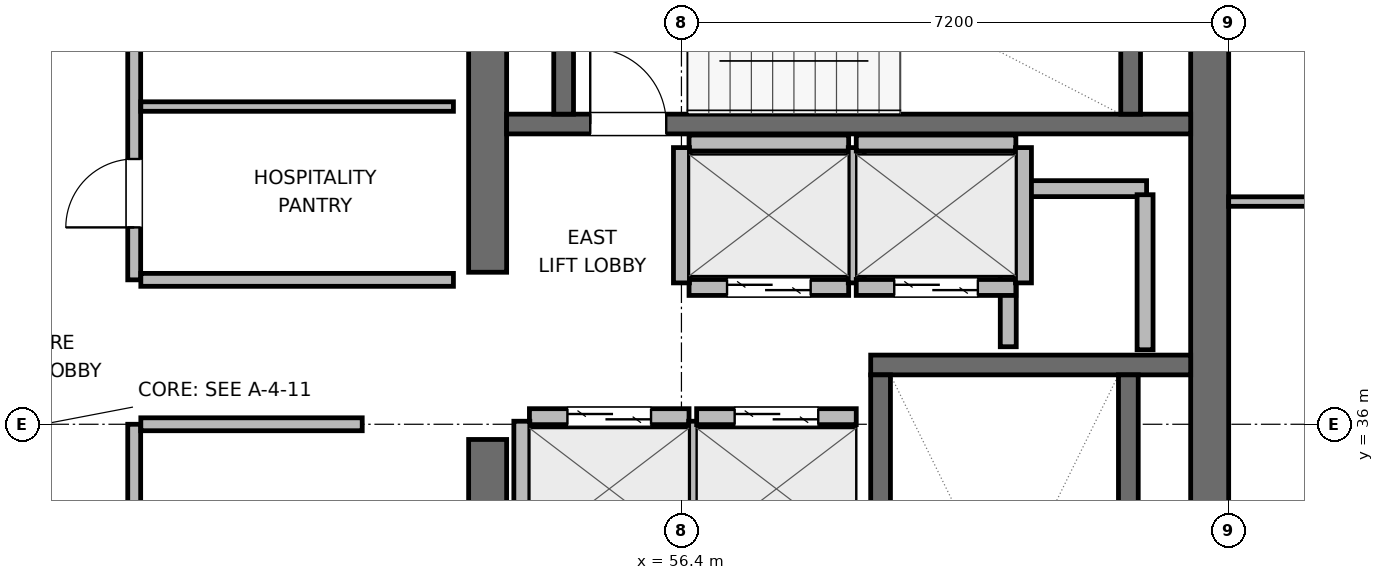
"""IFC4 building model, lengths in metres.
Left out: names, types, materials, properties, quantities, classifications, styles, units other than length and angle.
Written with IfcOpenShell. Run it as: python <this file> out.ifc"""

import sys

from ifc_helpers import new_model, si_unit, direction, frame, frame_2d, origin, place, context, subcontext, project, spatial, rectangle, extrude, element, fill, save


model = new_model("IFC4")
c1 = context("Model", 3, precision=1e-05, world=origin(), true_north=direction((0.0, 1.0)))
c2 = subcontext(c1, "Body", "Model", "MODEL_VIEW")
j1 = project(units=[si_unit("LENGTHUNIT", "METRE"), si_unit("PLANEANGLEUNIT", "RADIAN")], contexts=[c1])
p1 = place(None, origin())
s1 = spatial("IfcSite", under=j1, at=p1, CompositionType="ELEMENT")
p2 = place(p1, origin())
s2 = spatial("IfcBuilding", under=s1, at=p2, CompositionType="ELEMENT")
p3 = place(p2, frame((0.0, 0.0, 270.6)))
s3 = spatial("IfcBuildingStorey", under=s2, at=p3, CompositionType="ELEMENT", Elevation=270.6)
p4 = place(p3, frame((53.85, 27.85, 0.0), z_axis=(0.0, 0.0, 1.0), x_axis=(0.0, 1.0, 0.0)))
e1 = element("IfcWall", 1, at=p4, inside=s3, PredefinedType="SHEAR", context=c2, shape_type="SweptSolid", body=[
    extrude(rectangle(XDim=7.95, YDim=0.5, at=frame_2d((3.975, 0.0))), origin(), (0.0, 0.0, 1.0), 3.9),
])
p5 = place(p3, frame((53.85, 38.0, 0.0), z_axis=(0.0, 0.0, 1.0), x_axis=(0.0, 1.0, 0.0)))
e2 = element("IfcWall", 2, at=p5, inside=s3, PredefinedType="SHEAR", context=c2, shape_type="SweptSolid", body=[
    extrude(rectangle(XDim=6.15, YDim=0.5, at=frame_2d((3.075, 0.0))), origin(), (0.0, 0.0, 1.0), 3.9),
])
p6 = place(p3, frame((63.35, 27.6, 0.0), z_axis=(0.0, 0.0, 1.0), x_axis=(0.0, 1.0, 0.0)))
e3 = element("IfcWall", 3, at=p6, inside=s3, PredefinedType="SHEAR", context=c2, shape_type="SweptSolid", body=[
    extrude(rectangle(XDim=16.8, YDim=0.5, at=frame_2d((8.4, 0.0))), origin(), (0.0, 0.0, 1.0), 3.9),
])
p7 = place(p3, frame((58.89, 36.78, 0.0), z_axis=(0.0, 0.0, 1.0), x_axis=(1.0, 0.0, 0.0)))
e4 = element("IfcWall", 4, at=p7, inside=s3, PredefinedType="SHEAR", context=c2, shape_type="SweptSolid", body=[
    extrude(rectangle(XDim=4.21, YDim=0.26, at=frame_2d((2.105, 0.0))), origin(), (0.0, 0.0, 1.0), 3.9),
])
p8 = place(p3, frame((59.02, 29.05, 0.0), z_axis=(0.0, 0.0, 1.0), x_axis=(0.0, 1.0, 0.0)))
e5 = element("IfcWall", 5, at=p8, inside=s3, PredefinedType="SHEAR", context=c2, shape_type="SweptSolid", body=[
    extrude(rectangle(XDim=7.6, YDim=0.26, at=frame_2d((3.8, 0.0))), origin(), (0.0, 0.0, 1.0), 3.9),
])
p9 = place(p8, frame((0.3, 0.0, 0.0)))
e6 = element("IfcOpeningElement", 6, at=p9, cuts=e5, PredefinedType="OPENING", context=c2, shape_type="SweptSolid", body=[
    extrude(rectangle(XDim=1.0, YDim=2.04, at=frame_2d((0.5, 1.02))), frame((0.0, 0.14, 0.0), z_axis=(0.0, -1.0, 0.0), x_axis=(1.0, 0.0, 0.0)), (0.0, 0.0, 1.0), 0.28),
])
p10 = place(p3, frame((62.28, 29.05, 0.0), z_axis=(0.0, 0.0, 1.0), x_axis=(0.0, 1.0, 0.0)))
e7 = element("IfcWall", 7, at=p10, inside=s3, PredefinedType="SHEAR", context=c2, shape_type="SweptSolid", body=[
    extrude(rectangle(XDim=7.6, YDim=0.26, at=frame_2d((3.8, 0.0))), origin(), (0.0, 0.0, 1.0), 3.9),
])
p11 = place(p3, frame((54.1, 39.95, 0.0), z_axis=(0.0, 0.0, 1.0), x_axis=(1.0, 0.0, 0.0)))
e8 = element("IfcWall", 8, at=p11, inside=s3, PredefinedType="SHEAR", context=c2, shape_type="SweptSolid", body=[
    extrude(rectangle(XDim=9.0, YDim=0.26, at=frame_2d((4.5, 0.0))), origin(), (0.0, 0.0, 1.0), 3.9),
])
p12 = place(p11, frame((1.1, 0.0, 0.0)))
e9 = element("IfcOpeningElement", 9, at=p12, cuts=e8, PredefinedType="OPENING", context=c2, shape_type="SweptSolid", body=[
    extrude(rectangle(XDim=1.0, YDim=2.04, at=frame_2d((0.5, 1.02))), frame((0.0, 0.14, 0.0), z_axis=(0.0, -1.0, 0.0), x_axis=(1.0, 0.0, 0.0)), (0.0, 0.0, 1.0), 0.28),
])
for number, where, z_axis, x_axis in (
    (10, (54.85, 40.08, 0.0), (0.0, 0.0, 1.0), (0.0, 1.0, 0.0)),
    (11, (62.31, 40.08, 0.0), (0.0, 0.0, 1.0), (0.0, 1.0, 0.0)),
):
    element("IfcWall", number, at=place(p3, frame(where, z_axis=z_axis, x_axis=x_axis)), inside=s3, PredefinedType="SHEAR", context=c2, shape_type="SweptSolid", body=[
        extrude(rectangle(XDim=2.94, YDim=0.26, at=frame_2d((1.47, 0.0))), origin(), (0.0, 0.0, 1.0), 3.9),
    ])
p13 = place(p3, frame((60.72, 39.1, 0.0), z_axis=(0.0, 0.0, 1.0), x_axis=(1.0, 0.0, 0.0)))
e12 = element("IfcWall", 12, at=p13, inside=s3, PredefinedType="PARTITIONING", context=c2, shape_type="SweptSolid", body=[
    extrude(rectangle(XDim=1.8, YDim=0.21, at=frame_2d((0.9, 0.0))), origin(), (0.0, 0.0, 1.0), 3.68),
])
p14 = place(p3, frame((60.7, 37.02, 0.0), z_axis=(0.0, 0.0, 1.0), x_axis=(0.0, 1.0, 0.0)))
e13 = element("IfcWall", 13, at=p14, inside=s3, PredefinedType="PARTITIONING", context=c2, shape_type="SweptSolid", body=[
    extrude(rectangle(XDim=1.96, YDim=0.21, at=frame_2d((0.98, 0.0))), origin(), (0.0, 0.0, 1.0), 3.68),
])
p15 = place(p3, frame((62.5, 36.98, 0.0), z_axis=(0.0, 0.0, 1.0), x_axis=(0.0, 1.0, 0.0)))
e14 = element("IfcWall", 14, at=p15, inside=s3, PredefinedType="PARTITIONING", context=c2, shape_type="SweptSolid", body=[
    extrude(rectangle(XDim=2.04, YDim=0.21, at=frame_2d((1.02, 0.0))), origin(), (0.0, 0.0, 1.0), 3.68),
])
p16 = place(p3, frame((54.4, 36.1, 0.0), z_axis=(0.0, 0.0, 1.0), x_axis=(1.0, 0.0, 0.0)))
e15 = element("IfcWall", 15, at=p16, inside=s3, PredefinedType="PARTITIONING", context=c2, shape_type="SweptSolid", body=[
    extrude(rectangle(XDim=2.1, YDim=0.21, at=frame_2d((1.05, 0.0))), origin(), (0.0, 0.0, 1.0), 3.68),
])
p17 = place(p16, frame((0.5, 0.0, 0.0)))
e16 = element("IfcOpeningElement", 16, at=p17, cuts=e15, PredefinedType="OPENING", context=c2, shape_type="SweptSolid", body=[
    extrude(rectangle(XDim=1.1, YDim=2.04, at=frame_2d((0.55, 1.02))), frame((0.0, 0.115, 0.0), z_axis=(0.0, -1.0, 0.0), x_axis=(1.0, 0.0, 0.0)), (0.0, 0.0, 1.0), 0.23),
])
for number, where, z_axis, x_axis in (
    (17, (54.3, 34.26, 0.0), (0.0, 0.0, 1.0), (0.0, 1.0, 0.0)),
    (18, (56.6, 34.26, 0.0), (0.0, 0.0, 1.0), (0.0, 1.0, 0.0)),
):
    element("IfcWall", number, at=place(p3, frame(where, z_axis=z_axis, x_axis=x_axis)), inside=s3, PredefinedType="PARTITIONING", context=c2, shape_type="SweptSolid", body=[
        extrude(rectangle(XDim=1.78, YDim=0.21, at=frame_2d((0.89, 0.0))), origin(), (0.0, 0.0, 1.0), 3.68),
    ])
p18 = place(p3, frame((56.6, 36.1, 0.0), z_axis=(0.0, 0.0, 1.0), x_axis=(1.0, 0.0, 0.0)))
e19 = element("IfcWall", 19, at=p18, inside=s3, PredefinedType="PARTITIONING", context=c2, shape_type="SweptSolid", body=[
    extrude(rectangle(XDim=2.1, YDim=0.21, at=frame_2d((1.05, 0.0))), origin(), (0.0, 0.0, 1.0), 3.68),
])
p19 = place(p18, frame((0.5, 0.0, 0.0)))
e20 = element("IfcOpeningElement", 20, at=p19, cuts=e19, PredefinedType="OPENING", context=c2, shape_type="SweptSolid", body=[
    extrude(rectangle(XDim=1.1, YDim=2.04, at=frame_2d((0.55, 1.02))), frame((0.0, 0.115, 0.0), z_axis=(0.0, -1.0, 0.0), x_axis=(1.0, 0.0, 0.0)), (0.0, 0.0, 1.0), 0.23),
])
p20 = place(p3, frame((56.5, 37.8, 0.0), z_axis=(0.0, 0.0, 1.0), x_axis=(1.0, 0.0, 0.0)))
e21 = element("IfcWall", 21, at=p20, inside=s3, PredefinedType="PARTITIONING", context=c2, shape_type="SweptSolid", body=[
    extrude(rectangle(XDim=2.1, YDim=0.21, at=frame_2d((1.05, 0.0))), origin(), (0.0, 0.0, 1.0), 3.68),
])
p21 = place(p20, frame((0.5, 0.0, 0.0)))
e22 = element("IfcOpeningElement", 22, at=p21, cuts=e21, PredefinedType="OPENING", context=c2, shape_type="SweptSolid", body=[
    extrude(rectangle(XDim=1.1, YDim=2.04, at=frame_2d((0.55, 1.02))), frame((0.0, 0.115, 0.0), z_axis=(0.0, -1.0, 0.0), x_axis=(1.0, 0.0, 0.0)), (0.0, 0.0, 1.0), 0.23),
])
p22 = place(p3, frame((56.5, 39.7, 0.0), z_axis=(0.0, 0.0, 1.0), x_axis=(1.0, 0.0, 0.0)))
e23 = element("IfcWall", 23, at=p22, inside=s3, PredefinedType="PARTITIONING", context=c2, shape_type="SweptSolid", body=[
    extrude(rectangle(XDim=2.1, YDim=0.21, at=frame_2d((1.05, 0.0))), origin(), (0.0, 0.0, 1.0), 3.68),
])
for number, where, z_axis, x_axis in (
    (24, (56.4, 37.86, 0.0), (0.0, 0.0, 1.0), (0.0, 1.0, 0.0)),
    (25, (58.7, 37.86, 0.0), (0.0, 0.0, 1.0), (0.0, 1.0, 0.0)),
):
    element("IfcWall", number, at=place(p3, frame(where, z_axis=z_axis, x_axis=x_axis)), inside=s3, PredefinedType="PARTITIONING", context=c2, shape_type="SweptSolid", body=[
        extrude(rectangle(XDim=1.78, YDim=0.21, at=frame_2d((0.89, 0.0))), origin(), (0.0, 0.0, 1.0), 3.68),
    ])
p23 = place(p3, frame((58.7, 37.8, 0.0), z_axis=(0.0, 0.0, 1.0), x_axis=(1.0, 0.0, 0.0)))
e26 = element("IfcWall", 26, at=p23, inside=s3, PredefinedType="PARTITIONING", context=c2, shape_type="SweptSolid", body=[
    extrude(rectangle(XDim=2.1, YDim=0.21, at=frame_2d((1.05, 0.0))), origin(), (0.0, 0.0, 1.0), 3.68),
])
p24 = place(p23, frame((0.5, 0.0, 0.0)))
e27 = element("IfcOpeningElement", 27, at=p24, cuts=e26, PredefinedType="OPENING", context=c2, shape_type="SweptSolid", body=[
    extrude(rectangle(XDim=1.1, YDim=2.04, at=frame_2d((0.55, 1.02))), frame((0.0, 0.115, 0.0), z_axis=(0.0, -1.0, 0.0), x_axis=(1.0, 0.0, 0.0)), (0.0, 0.0, 1.0), 0.23),
])
p25 = place(p3, frame((58.7, 39.7, 0.0), z_axis=(0.0, 0.0, 1.0), x_axis=(1.0, 0.0, 0.0)))
e28 = element("IfcWall", 28, at=p25, inside=s3, PredefinedType="PARTITIONING", context=c2, shape_type="SweptSolid", body=[
    extrude(rectangle(XDim=2.1, YDim=0.21, at=frame_2d((1.05, 0.0))), origin(), (0.0, 0.0, 1.0), 3.68),
])
p26 = place(p3, frame((60.9, 37.86, 0.0), z_axis=(0.0, 0.0, 1.0), x_axis=(0.0, 1.0, 0.0)))
e29 = element("IfcWall", 29, at=p26, inside=s3, PredefinedType="PARTITIONING", context=c2, shape_type="SweptSolid", body=[
    extrude(rectangle(XDim=1.78, YDim=0.21, at=frame_2d((0.89, 0.0))), origin(), (0.0, 0.0, 1.0), 3.68),
])
p27 = place(p3, frame((49.2, 32.6, 0.0), z_axis=(0.0, 0.0, 1.0), x_axis=(0.0, 1.0, 0.0)))
e30 = element("IfcWall", 30, at=p27, inside=s3, PredefinedType="PARTITIONING", context=c2, shape_type="SweptSolid", body=[
    extrude(rectangle(XDim=3.4, YDim=0.17, at=frame_2d((1.7, 0.0))), origin(), (0.0, 0.0, 1.0), 3.68),
])
p28 = place(p27, frame((0.638, 0.0, 0.0)))
e31 = element("IfcOpeningElement", 31, at=p28, cuts=e30, PredefinedType="OPENING", context=c2, shape_type="SweptSolid", body=[
    extrude(rectangle(XDim=0.9, YDim=2.02, at=frame_2d((0.45, 1.01))), frame((0.0, 0.095, 0.0), z_axis=(0.0, -1.0, 0.0), x_axis=(1.0, 0.0, 0.0)), (0.0, 0.0, 1.0), 0.19),
])
p29 = place(p3, frame((49.287, 36.0, 0.0), z_axis=(0.0, 0.0, 1.0), x_axis=(1.0, 0.0, 0.0)))
e32 = element("IfcWall", 32, at=p29, inside=s3, PredefinedType="PARTITIONING", context=c2, shape_type="SweptSolid", body=[
    extrude(rectangle(XDim=2.913, YDim=0.17, at=frame_2d((1.457, 0.0))), origin(), (0.0, 0.0, 1.0), 3.68),
])
p30 = place(p3, frame((49.2, 37.9, 0.0), z_axis=(0.0, 0.0, 1.0), x_axis=(0.0, 1.0, 0.0)))
e33 = element("IfcWall", 33, at=p30, inside=s3, PredefinedType="PARTITIONING", context=c2, shape_type="SweptSolid", body=[
    extrude(rectangle(XDim=6.0, YDim=0.17, at=frame_2d((3.0, 0.0))), origin(), (0.0, 0.0, 1.0), 3.68),
])
p31 = place(p30, frame((0.69, 0.0, 0.0)))
e34 = element("IfcOpeningElement", 34, at=p31, cuts=e33, PredefinedType="OPENING", context=c2, shape_type="SweptSolid", body=[
    extrude(rectangle(XDim=0.9, YDim=2.02, at=frame_2d((0.45, 1.01))), frame((0.0, 0.095, 0.0), z_axis=(0.0, -1.0, 0.0), x_axis=(1.0, 0.0, 0.0)), (0.0, 0.0, 1.0), 0.19),
])
p32 = place(p30, frame((3.69, 0.0, 0.0)))
e35 = element("IfcOpeningElement", 35, at=p32, cuts=e33, PredefinedType="OPENING", context=c2, shape_type="SweptSolid", body=[
    extrude(rectangle(XDim=0.9, YDim=2.02, at=frame_2d((0.45, 1.01))), frame((0.0, 0.095, 0.0), z_axis=(0.0, -1.0, 0.0), x_axis=(1.0, 0.0, 0.0)), (0.0, 0.0, 1.0), 0.19),
])
p33 = place(p3, frame((49.287, 37.9, 0.0), z_axis=(0.0, 0.0, 1.0), x_axis=(1.0, 0.0, 0.0)))
e36 = element("IfcWall", 36, at=p33, inside=s3, PredefinedType="PARTITIONING", context=c2, shape_type="SweptSolid", body=[
    extrude(rectangle(XDim=4.113, YDim=0.17, at=frame_2d((2.056, 0.0))), origin(), (0.0, 0.0, 1.0), 3.68),
])
p34 = place(p3, frame((49.287, 40.18, 0.0), z_axis=(0.0, 0.0, 1.0), x_axis=(1.0, 0.0, 0.0)))
e37 = element("IfcWall", 37, at=p34, inside=s3, PredefinedType="PARTITIONING", context=c2, shape_type="SweptSolid", body=[
    extrude(rectangle(XDim=4.113, YDim=0.125, at=frame_2d((2.056, 0.0))), origin(), (0.0, 0.0, 1.0), 3.68),
])
p35 = place(p3, frame((63.6, 38.93, 0.0), z_axis=(0.0, 0.0, 1.0), x_axis=(1.0, 0.0, 0.0)))
e38 = element("IfcWall", 38, at=p35, inside=s3, PredefinedType="PARTITIONING", context=c2, shape_type="SweptSolid", body=[
    extrude(rectangle(XDim=4.845, YDim=0.125, at=frame_2d((2.422, 0.0))), origin(), (0.0, 0.0, 1.0), 3.68),
])
p36 = place(p35, frame((2.1, 0.0, 0.0)))
e39 = element("IfcOpeningElement", 39, at=p36, cuts=e38, PredefinedType="OPENING", context=c2, shape_type="SweptSolid", body=[
    extrude(rectangle(XDim=0.9, YDim=2.02, at=frame_2d((0.45, 1.01))), frame((0.0, 0.073, 0.0), z_axis=(0.0, -1.0, 0.0), x_axis=(1.0, 0.0, 0.0)), (0.0, 0.0, 1.0), 0.145),
])
p37 = place(p12, origin())
e40 = element("IfcDoor", 40, at=p37, inside=s3, OperationType="SINGLE_SWING_LEFT", PredefinedType="DOOR", context=c2, shape_type="SweptSolid", body=[
    extrude(rectangle(XDim=1.0, YDim=2.04, at=frame_2d((0.5, 1.02))), frame((0.0, 0.025, 0.0), z_axis=(0.0, -1.0, 0.0), x_axis=(1.0, 0.0, 0.0)), (0.0, 0.0, 1.0), 0.05),
])
fill(e9, e40)
p38 = place(p17, origin())
e41 = element("IfcDoor", 41, at=p38, inside=s3, OperationType="DOUBLE_DOOR_SLIDING", PredefinedType="DOOR", context=c2, shape_type="SweptSolid", body=[
    extrude(rectangle(XDim=1.1, YDim=2.04, at=frame_2d((0.55, 1.02))), frame((0.0, 0.025, 0.0), z_axis=(0.0, -1.0, 0.0), x_axis=(1.0, 0.0, 0.0)), (0.0, 0.0, 1.0), 0.05),
])
fill(e16, e41)
p39 = place(p19, origin())
e42 = element("IfcDoor", 42, at=p39, inside=s3, OperationType="DOUBLE_DOOR_SLIDING", PredefinedType="DOOR", context=c2, shape_type="SweptSolid", body=[
    extrude(rectangle(XDim=1.1, YDim=2.04, at=frame_2d((0.55, 1.02))), frame((0.0, 0.025, 0.0), z_axis=(0.0, -1.0, 0.0), x_axis=(1.0, 0.0, 0.0)), (0.0, 0.0, 1.0), 0.05),
])
fill(e20, e42)
p40 = place(p21, origin())
e43 = element("IfcDoor", 43, at=p40, inside=s3, OperationType="DOUBLE_DOOR_SLIDING", PredefinedType="DOOR", context=c2, shape_type="SweptSolid", body=[
    extrude(rectangle(XDim=1.1, YDim=2.04, at=frame_2d((0.55, 1.02))), frame((0.0, 0.025, 0.0), z_axis=(0.0, -1.0, 0.0), x_axis=(1.0, 0.0, 0.0)), (0.0, 0.0, 1.0), 0.05),
])
fill(e22, e43)
p41 = place(p24, origin())
e44 = element("IfcDoor", 44, at=p41, inside=s3, OperationType="DOUBLE_DOOR_SLIDING", PredefinedType="DOOR", context=c2, shape_type="SweptSolid", body=[
    extrude(rectangle(XDim=1.1, YDim=2.04, at=frame_2d((0.55, 1.02))), frame((0.0, 0.025, 0.0), z_axis=(0.0, -1.0, 0.0), x_axis=(1.0, 0.0, 0.0)), (0.0, 0.0, 1.0), 0.05),
])
fill(e27, e44)
p42 = place(p31, origin())
e45 = element("IfcDoor", 45, at=p42, inside=s3, OperationType="SINGLE_SWING_LEFT", PredefinedType="DOOR", context=c2, shape_type="SweptSolid", body=[
    extrude(rectangle(XDim=0.9, YDim=2.02, at=frame_2d((0.45, 1.01))), frame((0.0, 0.025, 0.0), z_axis=(0.0, -1.0, 0.0), x_axis=(1.0, 0.0, 0.0)), (0.0, 0.0, 1.0), 0.05),
])
fill(e34, e45)
save(model, sys.argv[1])
